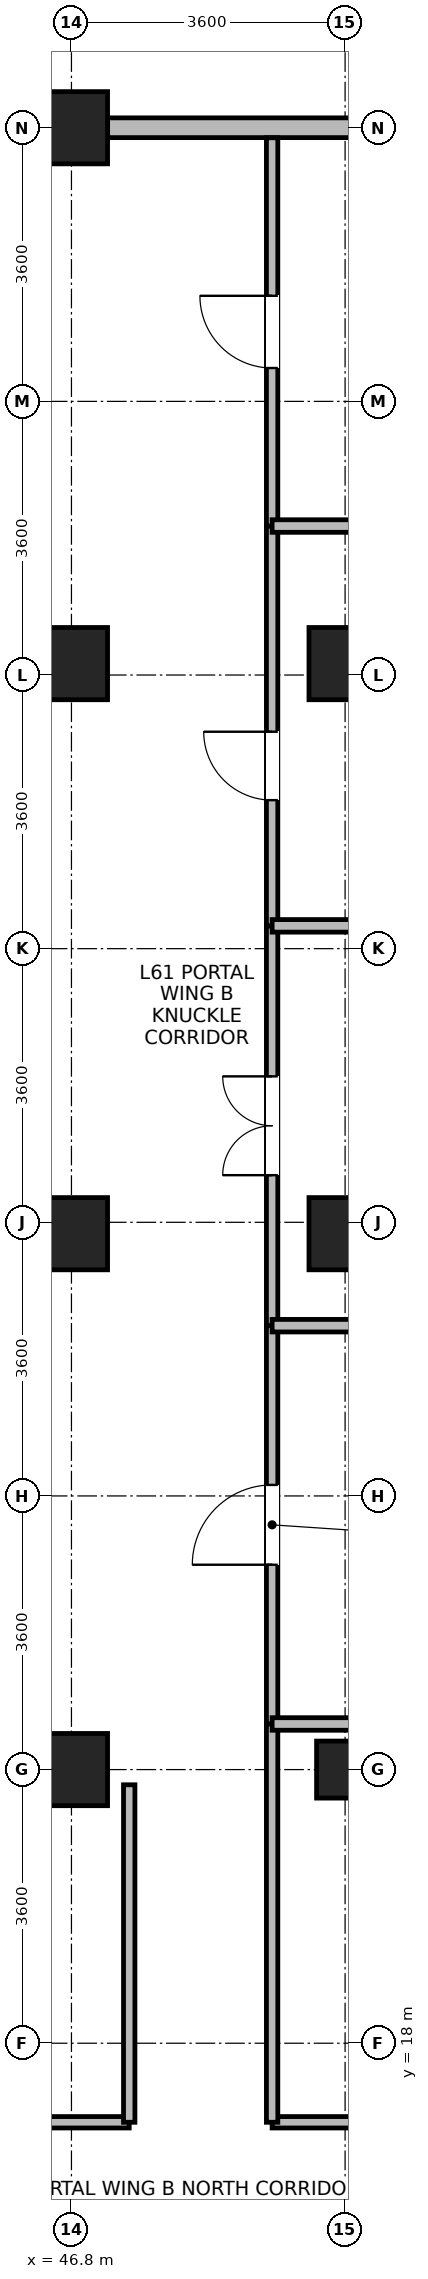
"""IFC4 building model, lengths in metres.
Left out: names, types, materials, properties, quantities, classifications, styles, units other than length and angle.
Written with IfcOpenShell. Run it as: python <this file> out.ifc"""

import sys

from ifc_helpers import new_model, si_unit, direction, frame, frame_2d, origin, origin_2d, place, context, subcontext, project, spatial, rectangle, extrude, source, transform, mapped, element, fill, save


model = new_model("IFC4")
c1 = context("Model", 3, precision=1e-05, world=origin(), true_north=direction((0.0, 1.0)))
c2 = subcontext(c1, "Body", "Model", "MODEL_VIEW")
j1 = project(units=[si_unit("LENGTHUNIT", "METRE"), si_unit("PLANEANGLEUNIT", "RADIAN")], contexts=[c1])
p1 = place(None, origin())
s1 = spatial("IfcSite", under=j1, at=p1, CompositionType="ELEMENT")
p2 = place(p1, origin())
s2 = spatial("IfcBuilding", under=s1, at=p2, CompositionType="ELEMENT")
p3 = place(p2, frame((0.0, 0.0, 238.8)))
s3 = spatial("IfcBuildingStorey", under=s2, at=p3, CompositionType="ELEMENT", Elevation=238.8)
m1 = source(origin(), c2, "Body", "SweptSolid", [
    extrude(rectangle(XDim=0.95, YDim=0.95, at=origin_2d()), origin(), (0.0, 0.0, 1.0), 3.7),
])
for number, where, z_axis, x_axis in (
    (1, (46.8, 21.6, 0.0), (0.0, 0.0, 1.0), (1.0, 0.0, 0.0)),
    (2, (46.8, 28.65, 0.0), (0.0, 0.0, 1.0), (1.0, 0.0, 0.0)),
    (3, (46.8, 36.15, 0.0), (0.0, 0.0, 1.0), (1.0, 0.0, 0.0)),
    (4, (46.8, 43.2, 0.0), (0.0, 0.0, 1.0), (1.0, 0.0, 0.0)),
):
    element("IfcColumn", number, at=place(p3, frame(where, z_axis=z_axis, x_axis=x_axis)), inside=s3, PredefinedType="COLUMN", context=c2, shape_type="MappedRepresentation", body=[
        mapped(m1, transform((0.0, 0.0, 0.0), x_axis=(1.0, 0.0, 0.0), y_axis=(0.0, 1.0, 0.0), z_axis=(0.0, 0.0, 1.0), scale=1.0)),
    ])
m2 = source(origin(), c2, "Body", "SweptSolid", [
    extrude(rectangle(XDim=0.75, YDim=0.75, at=origin_2d()), origin(), (0.0, 0.0, 1.0), 3.7),
])
p4 = place(p3, frame((50.4, 21.6, 0.0), z_axis=(0.0, 0.0, 1.0), x_axis=(1.0, 0.0, 0.0)))
e5 = element("IfcColumn", 5, at=p4, inside=s3, PredefinedType="PILASTER", context=c2, shape_type="MappedRepresentation", body=[
    mapped(m2, transform((0.0, 0.0, 0.0), x_axis=(1.0, 0.0, 0.0), y_axis=(0.0, 1.0, 0.0), z_axis=(0.0, 0.0, 1.0), scale=1.0)),
])
for number, where, z_axis, x_axis in (
    (6, (50.4, 28.65, 0.0), (0.0, 0.0, 1.0), (1.0, 0.0, 0.0)),
    (7, (50.4, 36.15, 0.0), (0.0, 0.0, 1.0), (1.0, 0.0, 0.0)),
):
    element("IfcColumn", number, at=place(p3, frame(where, z_axis=z_axis, x_axis=x_axis)), inside=s3, PredefinedType="COLUMN", context=c2, shape_type="MappedRepresentation", body=[
        mapped(m1, transform((0.0, 0.0, 0.0), x_axis=(1.0, 0.0, 0.0), y_axis=(0.0, 1.0, 0.0), z_axis=(0.0, 0.0, 1.0), scale=1.0)),
    ])
p5 = place(p3, frame((47.276, 43.2, 0.0), z_axis=(0.0, 0.0, 1.0), x_axis=(1.0, 0.0, 0.0)))
e8 = element("IfcWall", 8, at=p5, inside=s3, PredefinedType="STANDARD", context=c2, shape_type="SweptSolid", body=[
    extrude(rectangle(XDim=13.289, YDim=0.26, at=frame_2d((6.645, 0.0))), origin(), (0.0, 0.0, 1.0), 3.42),
])
p6 = place(p5, frame((4.383, 0.0, 0.85)))
e9 = element("IfcOpeningElement", 9, at=p6, cuts=e8, PredefinedType="OPENING", context=c2, shape_type="SweptSolid", body=[
    extrude(rectangle(XDim=1.2, YDim=1.75, at=frame_2d((0.6, 0.875))), frame((0.0, 0.14, 0.0), z_axis=(0.0, -1.0, 0.0), x_axis=(1.0, 0.0, 0.0)), (0.0, 0.0, 1.0), 0.28),
])
p7 = place(p5, frame((7.706, 0.0, 0.85)))
e10 = element("IfcOpeningElement", 10, at=p7, cuts=e8, PredefinedType="OPENING", context=c2, shape_type="SweptSolid", body=[
    extrude(rectangle(XDim=1.2, YDim=1.75, at=frame_2d((0.6, 0.875))), frame((0.0, 0.14, 0.0), z_axis=(0.0, -1.0, 0.0), x_axis=(1.0, 0.0, 0.0)), (0.0, 0.0, 1.0), 0.28),
])
p8 = place(p5, frame((11.028, 0.0, 0.85)))
e11 = element("IfcOpeningElement", 11, at=p8, cuts=e8, PredefinedType="OPENING", context=c2, shape_type="SweptSolid", body=[
    extrude(rectangle(XDim=1.2, YDim=1.75, at=frame_2d((0.6, 0.875))), frame((0.0, 0.14, 0.0), z_axis=(0.0, -1.0, 0.0), x_axis=(1.0, 0.0, 0.0)), (0.0, 0.0, 1.0), 0.28),
])
p9 = place(p3, frame((35.52, 16.96, 0.0), z_axis=(0.0, 0.0, 1.0), x_axis=(1.0, 0.0, 0.0)))
e12 = element("IfcWall", 12, at=p9, inside=s3, PredefinedType="PARTITIONING", context=c2, shape_type="SweptSolid", body=[
    extrude(rectangle(XDim=12.04, YDim=0.15, at=frame_2d((6.02, 0.0))), origin(), (0.0, 0.0, 1.0), 3.42),
])
p10 = place(p9, frame((5.37, 0.0, 0.0)))
e13 = element("IfcOpeningElement", 13, at=p10, cuts=e12, PredefinedType="OPENING", context=c2, shape_type="SweptSolid", body=[
    extrude(rectangle(XDim=1.3, YDim=2.12, at=frame_2d((0.65, 1.06))), frame((0.0, 0.085, 0.0), z_axis=(0.0, -1.0, 0.0), x_axis=(1.0, 0.0, 0.0)), (0.0, 0.0, 1.0), 0.17),
])
p11 = place(p3, frame((49.44, 16.96, 0.0), z_axis=(0.0, 0.0, 1.0), x_axis=(1.0, 0.0, 0.0)))
e14 = element("IfcWall", 14, at=p11, inside=s3, PredefinedType="PARTITIONING", context=c2, shape_type="SweptSolid", body=[
    extrude(rectangle(XDim=11.128, YDim=0.15, at=frame_2d((5.564, 0.0))), origin(), (0.0, 0.0, 1.0), 3.42),
])
p12 = place(p11, frame((5.089, 0.0, 0.0)))
e15 = element("IfcOpeningElement", 15, at=p12, cuts=e14, PredefinedType="OPENING", context=c2, shape_type="SweptSolid", body=[
    extrude(rectangle(XDim=0.95, YDim=2.1, at=frame_2d((0.475, 1.05))), frame((0.0, 0.085, 0.0), z_axis=(0.0, -1.0, 0.0), x_axis=(1.0, 0.0, 0.0)), (0.0, 0.0, 1.0), 0.17),
])
p13 = place(p3, frame((49.44, 27.44, 0.0), z_axis=(0.0, 0.0, 1.0), x_axis=(0.0, 1.0, 0.0)))
e16 = element("IfcWall", 16, at=p13, inside=s3, PredefinedType="PARTITIONING", context=c2, shape_type="SweptSolid", body=[
    extrude(rectangle(XDim=5.26, YDim=0.15, at=frame_2d((2.63, 0.0))), origin(), (0.0, 0.0, 1.0), 3.42),
])
p14 = place(p13, frame((1.98, 0.0, 0.0)))
e17 = element("IfcOpeningElement", 17, at=p14, cuts=e16, PredefinedType="OPENING", context=c2, shape_type="SweptSolid", body=[
    extrude(rectangle(XDim=1.3, YDim=2.12, at=frame_2d((0.65, 1.06))), frame((0.0, 0.085, 0.0), z_axis=(0.0, -1.0, 0.0), x_axis=(1.0, 0.0, 0.0)), (0.0, 0.0, 1.0), 0.17),
])
p15 = place(p3, frame((49.44, 32.7, 0.0), z_axis=(0.0, 0.0, 1.0), x_axis=(0.0, 1.0, 0.0)))
e18 = element("IfcWall", 18, at=p15, inside=s3, PredefinedType="PARTITIONING", context=c2, shape_type="SweptSolid", body=[
    extrude(rectangle(XDim=5.26, YDim=0.15, at=frame_2d((2.63, 0.0))), origin(), (0.0, 0.0, 1.0), 3.42),
])
p16 = place(p15, frame((1.654, 0.0, 0.0)))
e19 = element("IfcOpeningElement", 19, at=p16, cuts=e18, PredefinedType="OPENING", context=c2, shape_type="SweptSolid", body=[
    extrude(rectangle(XDim=0.9, YDim=2.08, at=frame_2d((0.45, 1.04))), frame((0.0, 0.085, 0.0), z_axis=(0.0, -1.0, 0.0), x_axis=(1.0, 0.0, 0.0)), (0.0, 0.0, 1.0), 0.17),
])
p17 = place(p3, frame((49.44, 22.2, 0.0), z_axis=(0.0, 0.0, 1.0), x_axis=(0.0, 1.0, 0.0)))
e20 = element("IfcWall", 20, at=p17, inside=s3, PredefinedType="PARTITIONING", context=c2, shape_type="SweptSolid", body=[
    extrude(rectangle(XDim=5.24, YDim=0.15, at=frame_2d((2.62, 0.0))), origin(), (0.0, 0.0, 1.0), 3.42),
])
p18 = place(p17, frame((2.095, 0.0, 0.0)))
e21 = element("IfcOpeningElement", 21, at=p18, cuts=e20, PredefinedType="OPENING", context=c2, shape_type="SweptSolid", body=[
    extrude(rectangle(XDim=1.05, YDim=2.12, at=frame_2d((0.525, 1.06))), frame((0.0, 0.085, 0.0), z_axis=(0.0, -1.0, 0.0), x_axis=(1.0, 0.0, 0.0)), (0.0, 0.0, 1.0), 0.17),
])
p19 = place(p3, frame((49.44, 37.96, 0.0), z_axis=(0.0, 0.0, 1.0), x_axis=(0.0, 1.0, 0.0)))
e22 = element("IfcWall", 22, at=p19, inside=s3, PredefinedType="PARTITIONING", context=c2, shape_type="SweptSolid", body=[
    extrude(rectangle(XDim=5.108, YDim=0.15, at=frame_2d((2.554, 0.0))), origin(), (0.0, 0.0, 1.0), 3.42),
])
p20 = place(p19, frame((2.079, 0.0, 0.0)))
e23 = element("IfcOpeningElement", 23, at=p20, cuts=e22, PredefinedType="OPENING", context=c2, shape_type="SweptSolid", body=[
    extrude(rectangle(XDim=0.95, YDim=2.1, at=frame_2d((0.475, 1.05))), frame((0.0, 0.085, 0.0), z_axis=(0.0, -1.0, 0.0), x_axis=(1.0, 0.0, 0.0)), (0.0, 0.0, 1.0), 0.17),
])
p21 = place(p3, frame((49.44, 16.96, 0.0), z_axis=(0.0, 0.0, 1.0), x_axis=(0.0, 1.0, 0.0)))
e24 = element("IfcWall", 24, at=p21, inside=s3, PredefinedType="PARTITIONING", context=c2, shape_type="SweptSolid", body=[
    extrude(rectangle(XDim=5.24, YDim=0.15, at=frame_2d((2.62, 0.0))), origin(), (0.0, 0.0, 1.0), 3.42),
])
p22 = place(p3, frame((47.56, 16.96, 0.0), z_axis=(0.0, 0.0, 1.0), x_axis=(0.0, 1.0, 0.0)))
e25 = element("IfcWall", 25, at=p22, inside=s3, PredefinedType="PARTITIONING", context=c2, shape_type="SweptSolid", body=[
    extrude(rectangle(XDim=4.44, YDim=0.15, at=frame_2d((2.22, 0.0))), origin(), (0.0, 0.0, 1.0), 3.42),
])
for number, where, z_axis, x_axis in (
    (26, (49.44, 22.2, 0.0), (0.0, 0.0, 1.0), (1.0, 0.0, 0.0)),
    (27, (49.44, 27.44, 0.0), (0.0, 0.0, 1.0), (1.0, 0.0, 0.0)),
    (28, (49.44, 32.7, 0.0), (0.0, 0.0, 1.0), (1.0, 0.0, 0.0)),
    (29, (49.44, 37.96, 0.0), (0.0, 0.0, 1.0), (1.0, 0.0, 0.0)),
):
    element("IfcWall", number, at=place(p3, frame(where, z_axis=z_axis, x_axis=x_axis)), inside=s3, PredefinedType="PARTITIONING", context=c2, shape_type="SweptSolid", body=[
        extrude(rectangle(XDim=11.128, YDim=0.165, at=frame_2d((5.564, 0.0))), origin(), (0.0, 0.0, 1.0), 3.42),
    ])
p23 = place(p14, origin())
e30 = element("IfcDoor", 30, at=p23, inside=s3, OperationType="DOUBLE_DOOR_SINGLE_SWING", PredefinedType="DOOR", context=c2, shape_type="SweptSolid", body=[
    extrude(rectangle(XDim=1.3, YDim=2.12, at=frame_2d((0.65, 1.06))), frame((0.0, 0.025, 0.0), z_axis=(0.0, -1.0, 0.0), x_axis=(1.0, 0.0, 0.0)), (0.0, 0.0, 1.0), 0.05),
])
fill(e17, e30)
p24 = place(p16, origin())
e31 = element("IfcDoor", 31, at=p24, inside=s3, OperationType="SINGLE_SWING_RIGHT", PredefinedType="DOOR", context=c2, shape_type="SweptSolid", body=[
    extrude(rectangle(XDim=0.9, YDim=2.08, at=frame_2d((0.45, 1.04))), frame((0.0, 0.025, 0.0), z_axis=(0.0, -1.0, 0.0), x_axis=(1.0, 0.0, 0.0)), (0.0, 0.0, 1.0), 0.05),
])
fill(e19, e31)
p25 = place(p18, origin())
e32 = element("IfcDoor", 32, at=p25, inside=s3, OperationType="SINGLE_SWING_LEFT", PredefinedType="DOOR", context=c2, shape_type="SweptSolid", body=[
    extrude(rectangle(XDim=1.05, YDim=2.12, at=frame_2d((0.525, 1.06))), frame((0.0, 0.025, 0.0), z_axis=(0.0, -1.0, 0.0), x_axis=(1.0, 0.0, 0.0)), (0.0, 0.0, 1.0), 0.05),
])
fill(e21, e32)
p26 = place(p20, origin())
e33 = element("IfcDoor", 33, at=p26, inside=s3, OperationType="SINGLE_SWING_RIGHT", PredefinedType="DOOR", context=c2, shape_type="SweptSolid", body=[
    extrude(rectangle(XDim=0.95, YDim=2.1, at=frame_2d((0.475, 1.05))), frame((0.0, 0.025, 0.0), z_axis=(0.0, -1.0, 0.0), x_axis=(1.0, 0.0, 0.0)), (0.0, 0.0, 1.0), 0.05),
])
fill(e23, e33)
save(model, sys.argv[1])
